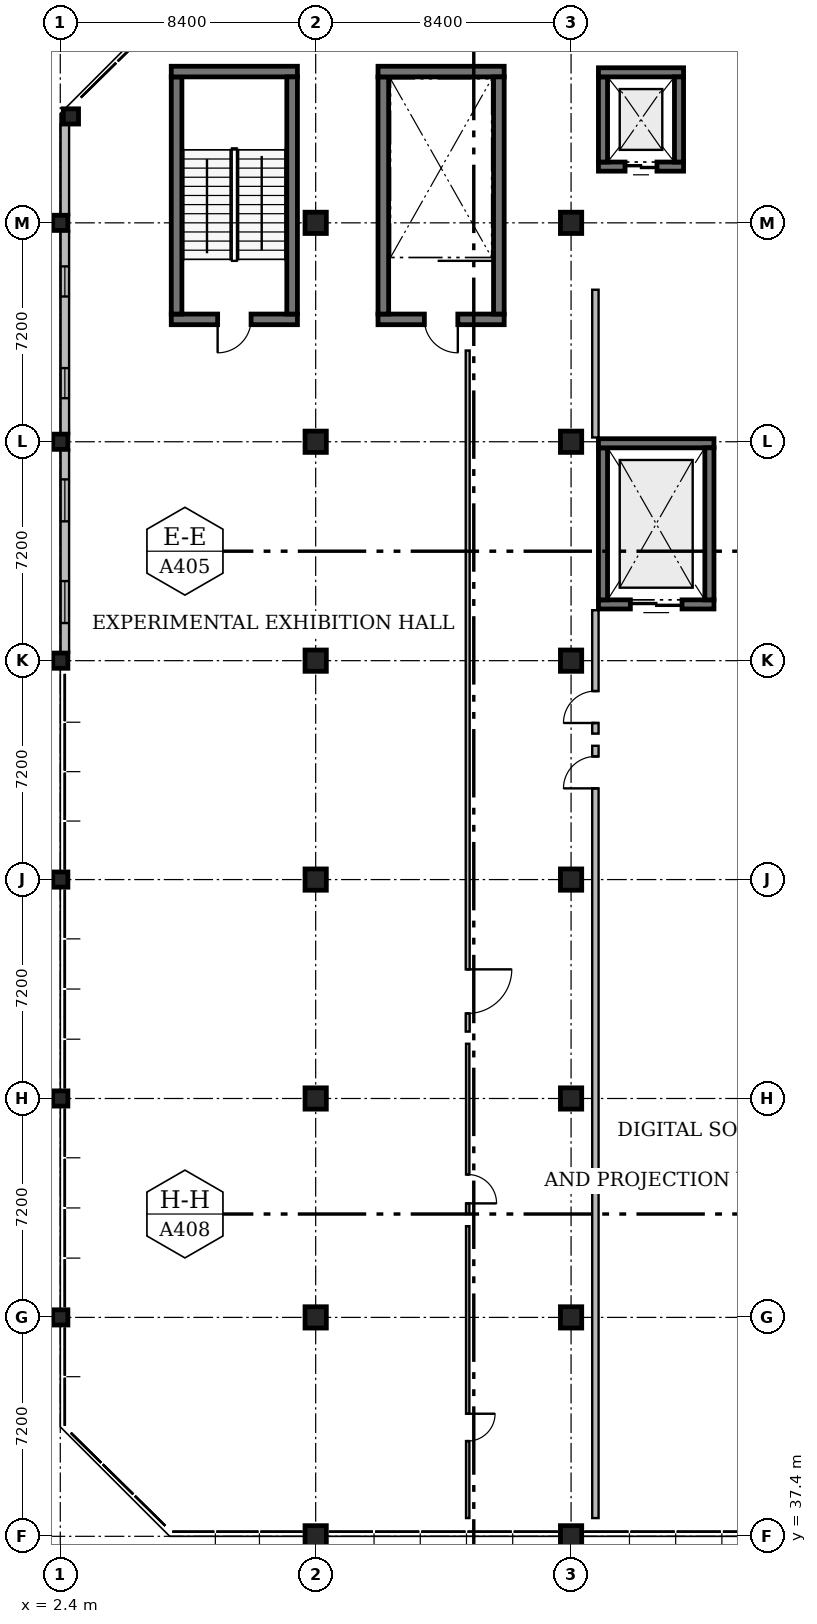
"""IFC4 building model, lengths in metres.
Left out: names, types, materials, properties, quantities, classifications, styles, units other than length and angle.
Written with IfcOpenShell. Run it as: python <this file> out.ifc"""

import sys

from ifc_helpers import new_model, si_unit, direction, frame, frame_2d, origin, origin_2d, place, context, subcontext, project, spatial, rectangle, extrude, element, fill, save


model = new_model("IFC4")
c1 = context("Model", 3, precision=1e-05, world=origin(), true_north=direction((0.0, 1.0)))
c2 = subcontext(c1, "Body", "Model", "MODEL_VIEW")
j1 = project(units=[si_unit("LENGTHUNIT", "METRE"), si_unit("PLANEANGLEUNIT", "RADIAN")], contexts=[c1])
p1 = place(None, origin())
s1 = spatial("IfcSite", under=j1, at=p1, CompositionType="ELEMENT")
p2 = place(p1, origin())
s2 = spatial("IfcBuilding", under=s1, at=p2, CompositionType="ELEMENT")
p3 = place(p2, origin())
s3 = spatial("IfcBuildingStorey", under=s2, at=p3, CompositionType="ELEMENT", Elevation=0.0)
for number, where, z_axis, x_axis in (
    (1, (2.4, 44.6, 0.0), (0.0, 0.0, 1.0), (1.0, 0.0, 0.0)),
    (2, (2.4, 51.8, 0.0), (0.0, 0.0, 1.0), (1.0, 0.0, 0.0)),
    (3, (2.4, 59.0, 0.0), (0.0, 0.0, 1.0), (1.0, 0.0, 0.0)),
    (4, (2.4, 66.2, 0.0), (0.0, 0.0, 1.0), (1.0, 0.0, 0.0)),
    (5, (2.4, 73.4, 0.0), (0.0, 0.0, 1.0), (1.0, 0.0, 0.0)),
    (6, (2.4, 80.6, 0.0), (0.0, 0.0, 1.0), (1.0, 0.0, 0.0)),
):
    element("IfcColumn", number, at=place(p3, frame(where, z_axis=z_axis, x_axis=x_axis)), inside=s3, PredefinedType="COLUMN", context=c2, shape_type="SweptSolid", body=[
        extrude(rectangle(XDim=0.5, YDim=0.5, at=origin_2d()), origin(), (0.0, 0.0, 1.0), 4.8),
    ])
p4 = place(p3, frame((10.8, 37.4, 0.0), z_axis=(0.0, 0.0, 1.0), x_axis=(1.0, 0.0, 0.0)))
e7 = element("IfcColumn", 7, at=p4, inside=s3, PredefinedType="COLUMN", context=c2, shape_type="SweptSolid", body=[
    extrude(rectangle(XDim=0.7, YDim=0.7, at=origin_2d()), origin(), (0.0, 0.0, 1.0), 4.66),
])
for number, where, z_axis, x_axis in (
    (8, (10.8, 44.6, 0.0), (0.0, 0.0, 1.0), (1.0, 0.0, 0.0)),
    (9, (10.8, 51.8, 0.0), (0.0, 0.0, 1.0), (1.0, 0.0, 0.0)),
    (10, (10.8, 59.0, 0.0), (0.0, 0.0, 1.0), (1.0, 0.0, 0.0)),
    (11, (10.8, 66.2, 0.0), (0.0, 0.0, 1.0), (1.0, 0.0, 0.0)),
    (12, (10.8, 73.4, 0.0), (0.0, 0.0, 1.0), (1.0, 0.0, 0.0)),
    (13, (10.8, 80.6, 0.0), (0.0, 0.0, 1.0), (1.0, 0.0, 0.0)),
):
    element("IfcColumn", number, at=place(p3, frame(where, z_axis=z_axis, x_axis=x_axis)), inside=s3, PredefinedType="COLUMN", context=c2, shape_type="SweptSolid", body=[
        extrude(rectangle(XDim=0.7, YDim=0.7, at=origin_2d()), origin(), (0.0, 0.0, 1.0), 4.8),
    ])
p5 = place(p3, frame((19.2, 37.4, 0.0), z_axis=(0.0, 0.0, 1.0), x_axis=(1.0, 0.0, 0.0)))
e14 = element("IfcColumn", 14, at=p5, inside=s3, PredefinedType="COLUMN", context=c2, shape_type="SweptSolid", body=[
    extrude(rectangle(XDim=0.7, YDim=0.7, at=origin_2d()), origin(), (0.0, 0.0, 1.0), 4.66),
])
for number, where, z_axis, x_axis in (
    (15, (19.2, 44.6, 0.0), (0.0, 0.0, 1.0), (1.0, 0.0, 0.0)),
    (16, (19.2, 51.8, 0.0), (0.0, 0.0, 1.0), (1.0, 0.0, 0.0)),
    (17, (19.2, 59.0, 0.0), (0.0, 0.0, 1.0), (1.0, 0.0, 0.0)),
    (18, (19.2, 66.2, 0.0), (0.0, 0.0, 1.0), (1.0, 0.0, 0.0)),
    (19, (19.2, 73.4, 0.0), (0.0, 0.0, 1.0), (1.0, 0.0, 0.0)),
    (20, (19.2, 80.6, 0.0), (0.0, 0.0, 1.0), (1.0, 0.0, 0.0)),
):
    element("IfcColumn", number, at=place(p3, frame(where, z_axis=z_axis, x_axis=x_axis)), inside=s3, PredefinedType="COLUMN", context=c2, shape_type="SweptSolid", body=[
        extrude(rectangle(XDim=0.7, YDim=0.7, at=origin_2d()), origin(), (0.0, 0.0, 1.0), 4.8),
    ])
p6 = place(p3, frame((2.75, 84.1, 0.0), z_axis=(0.0, 0.0, 1.0), x_axis=(1.0, 0.0, 0.0)))
e21 = element("IfcColumn", 21, at=p6, inside=s3, PredefinedType="COLUMN", context=c2, shape_type="SweptSolid", body=[
    extrude(rectangle(XDim=0.5, YDim=0.5, at=origin_2d()), origin(), (0.0, 0.0, 1.0), 4.8),
])
p7 = place(p3, frame((10.2, 77.425, 0.0), z_axis=(0.0, 0.0, 1.0), x_axis=(-1.0, 0.0, 0.0)))
e22 = element("IfcWall", 22, at=p7, inside=s3, PredefinedType="SOLIDWALL", context=c2, shape_type="SweptSolid", body=[
    extrude(rectangle(XDim=4.15, YDim=0.35, at=frame_2d((2.075, 0.0))), origin(), (0.0, 0.0, 1.0), 4.8),
])
p8 = place(p7, frame((1.525, 0.0, 0.0)))
e23 = element("IfcOpeningElement", 23, at=p8, cuts=e22, PredefinedType="OPENING", context=c2, shape_type="SweptSolid", body=[
    extrude(rectangle(XDim=1.1, YDim=2.15, at=frame_2d((0.55, 1.075))), frame((0.0, 0.195, 0.0), z_axis=(0.0, -1.0, 0.0), x_axis=(1.0, 0.0, 0.0)), (0.0, 0.0, 1.0), 0.39),
])
p9 = place(p3, frame((6.225, 77.6, 0.0), z_axis=(0.0, 0.0, 1.0), x_axis=(0.0, 1.0, 0.0)))
e24 = element("IfcWall", 24, at=p9, inside=s3, PredefinedType="SOLIDWALL", context=c2, shape_type="SweptSolid", body=[
    extrude(rectangle(XDim=7.8, YDim=0.35, at=frame_2d((3.9, 0.0))), origin(), (0.0, 0.0, 1.0), 4.8),
])
p10 = place(p3, frame((6.05, 85.575, 0.0), z_axis=(0.0, 0.0, 1.0), x_axis=(1.0, 0.0, 0.0)))
e25 = element("IfcWall", 25, at=p10, inside=s3, PredefinedType="SOLIDWALL", context=c2, shape_type="SweptSolid", body=[
    extrude(rectangle(XDim=4.15, YDim=0.35, at=frame_2d((2.075, 0.0))), origin(), (0.0, 0.0, 1.0), 4.8),
])
p11 = place(p3, frame((10.025, 85.4, 0.0), z_axis=(0.0, 0.0, 1.0), x_axis=(0.0, -1.0, 0.0)))
e26 = element("IfcWall", 26, at=p11, inside=s3, PredefinedType="SOLIDWALL", context=c2, shape_type="SweptSolid", body=[
    extrude(rectangle(XDim=7.8, YDim=0.35, at=frame_2d((3.9, 0.0))), origin(), (0.0, 0.0, 1.0), 4.8),
])
p12 = place(p3, frame((17.0, 77.425, 0.0), z_axis=(0.0, 0.0, 1.0), x_axis=(-1.0, 0.0, 0.0)))
e27 = element("IfcWall", 27, at=p12, inside=s3, PredefinedType="SOLIDWALL", context=c2, shape_type="SweptSolid", body=[
    extrude(rectangle(XDim=4.15, YDim=0.35, at=frame_2d((2.075, 0.0))), origin(), (0.0, 0.0, 1.0), 4.54),
])
p13 = place(p12, frame((1.525, 0.0, 0.0)))
e28 = element("IfcOpeningElement", 28, at=p13, cuts=e27, PredefinedType="OPENING", context=c2, shape_type="SweptSolid", body=[
    extrude(rectangle(XDim=1.1, YDim=2.15, at=frame_2d((0.55, 1.075))), frame((0.0, 0.195, 0.0), z_axis=(0.0, -1.0, 0.0), x_axis=(1.0, 0.0, 0.0)), (0.0, 0.0, 1.0), 0.39),
])
p14 = place(p3, frame((13.025, 77.6, 0.0), z_axis=(0.0, 0.0, 1.0), x_axis=(0.0, 1.0, 0.0)))
e29 = element("IfcWall", 29, at=p14, inside=s3, PredefinedType="SOLIDWALL", context=c2, shape_type="SweptSolid", body=[
    extrude(rectangle(XDim=7.8, YDim=0.35, at=frame_2d((3.9, 0.0))), origin(), (0.0, 0.0, 1.0), 4.54),
])
p15 = place(p3, frame((12.85, 85.575, 0.0), z_axis=(0.0, 0.0, 1.0), x_axis=(1.0, 0.0, 0.0)))
e30 = element("IfcWall", 30, at=p15, inside=s3, PredefinedType="SOLIDWALL", context=c2, shape_type="SweptSolid", body=[
    extrude(rectangle(XDim=4.15, YDim=0.35, at=frame_2d((2.075, 0.0))), origin(), (0.0, 0.0, 1.0), 4.54),
])
p16 = place(p3, frame((16.825, 85.4, 0.0), z_axis=(0.0, 0.0, 1.0), x_axis=(0.0, -1.0, 0.0)))
e31 = element("IfcWall", 31, at=p16, inside=s3, PredefinedType="SOLIDWALL", context=c2, shape_type="SweptSolid", body=[
    extrude(rectangle(XDim=7.8, YDim=0.35, at=frame_2d((3.9, 0.0))), origin(), (0.0, 0.0, 1.0), 4.54),
])
p17 = place(p3, frame((22.9, 82.45, 0.0), z_axis=(0.0, 0.0, 1.0), x_axis=(-1.0, 0.0, 0.0)))
e32 = element("IfcWall", 32, at=p17, inside=s3, PredefinedType="SOLIDWALL", context=c2, shape_type="SweptSolid", body=[
    extrude(rectangle(XDim=2.8, YDim=0.3, at=frame_2d((1.4, 0.0))), origin(), (0.0, 0.0, 1.0), 4.8),
])
p18 = place(p17, frame((0.875, 0.0, 0.0)))
e33 = element("IfcOpeningElement", 33, at=p18, cuts=e32, PredefinedType="OPENING", context=c2, shape_type="SweptSolid", body=[
    extrude(rectangle(XDim=1.05, YDim=2.15, at=frame_2d((0.525, 1.075))), frame((0.0, 0.17, 0.0), z_axis=(0.0, -1.0, 0.0), x_axis=(1.0, 0.0, 0.0)), (0.0, 0.0, 1.0), 0.34),
])
for number, where, z_axis, x_axis in (
    (34, (20.25, 82.6, 0.0), (0.0, 0.0, 1.0), (0.0, 1.0, 0.0)),
    (35, (20.1, 85.55, 0.0), (0.0, 0.0, 1.0), (1.0, 0.0, 0.0)),
    (36, (22.75, 85.4, 0.0), (0.0, 0.0, 1.0), (0.0, -1.0, 0.0)),
):
    element("IfcWall", number, at=place(p3, frame(where, z_axis=z_axis, x_axis=x_axis)), inside=s3, PredefinedType="SOLIDWALL", context=c2, shape_type="SweptSolid", body=[
        extrude(rectangle(XDim=2.8, YDim=0.3, at=frame_2d((1.4, 0.0))), origin(), (0.0, 0.0, 1.0), 4.8),
    ])
p19 = place(p3, frame((23.9, 68.05, 0.0), z_axis=(0.0, 0.0, 1.0), x_axis=(-1.0, 0.0, 0.0)))
e37 = element("IfcWall", 37, at=p19, inside=s3, PredefinedType="SOLIDWALL", context=c2, shape_type="SweptSolid", body=[
    extrude(rectangle(XDim=3.8, YDim=0.3, at=frame_2d((1.9, 0.0))), origin(), (0.0, 0.0, 1.0), 4.8),
])
p20 = place(p19, frame((1.05, 0.0, 0.0)))
e38 = element("IfcOpeningElement", 38, at=p20, cuts=e37, PredefinedType="OPENING", context=c2, shape_type="SweptSolid", body=[
    extrude(rectangle(XDim=1.7, YDim=2.4, at=frame_2d((0.85, 1.2))), frame((0.0, 0.17, 0.0), z_axis=(0.0, -1.0, 0.0), x_axis=(1.0, 0.0, 0.0)), (0.0, 0.0, 1.0), 0.34),
])
p21 = place(p3, frame((20.25, 68.2, 0.0), z_axis=(0.0, 0.0, 1.0), x_axis=(0.0, 1.0, 0.0)))
e39 = element("IfcWall", 39, at=p21, inside=s3, PredefinedType="SOLIDWALL", context=c2, shape_type="SweptSolid", body=[
    extrude(rectangle(XDim=5.0, YDim=0.3, at=frame_2d((2.5, 0.0))), origin(), (0.0, 0.0, 1.0), 4.8),
])
p22 = place(p3, frame((20.1, 73.35, 0.0), z_axis=(0.0, 0.0, 1.0), x_axis=(1.0, 0.0, 0.0)))
e40 = element("IfcWall", 40, at=p22, inside=s3, PredefinedType="SOLIDWALL", context=c2, shape_type="SweptSolid", body=[
    extrude(rectangle(XDim=3.8, YDim=0.3, at=frame_2d((1.9, 0.0))), origin(), (0.0, 0.0, 1.0), 4.8),
])
p23 = place(p3, frame((23.75, 73.2, 0.0), z_axis=(0.0, 0.0, 1.0), x_axis=(0.0, -1.0, 0.0)))
e41 = element("IfcWall", 41, at=p23, inside=s3, PredefinedType="SOLIDWALL", context=c2, shape_type="SweptSolid", body=[
    extrude(rectangle(XDim=5.0, YDim=0.3, at=frame_2d((2.5, 0.0))), origin(), (0.0, 0.0, 1.0), 4.8),
])
p24 = place(p3, frame((2.55, 66.455, 0.0), z_axis=(0.0, 0.0, 1.0), x_axis=(0.0, 1.0, 0.0)))
e42 = element("IfcWall", 42, at=p24, inside=s3, PredefinedType="SOLIDWALL", context=c2, shape_type="SweptSolid", body=[
    extrude(rectangle(XDim=6.69, YDim=0.28, at=frame_2d((3.345, 0.0))), origin(), (0.0, 0.0, 1.0), 3.873),
])
p25 = place(p24, frame((0.982, 0.0, 0.95)))
e43 = element("IfcOpeningElement", 43, at=p25, cuts=e42, PredefinedType="OPENING", context=c2, shape_type="SweptSolid", body=[
    extrude(rectangle(XDim=1.38, YDim=1.95, at=frame_2d((0.69, 0.975))), frame((0.0, 0.16, 0.0), z_axis=(0.0, -1.0, 0.0), x_axis=(1.0, 0.0, 0.0)), (0.0, 0.0, 1.0), 0.32),
])
p26 = place(p24, frame((4.327, 0.0, 0.95)))
e44 = element("IfcOpeningElement", 44, at=p26, cuts=e42, PredefinedType="OPENING", context=c2, shape_type="SweptSolid", body=[
    extrude(rectangle(XDim=1.38, YDim=1.95, at=frame_2d((0.69, 0.975))), frame((0.0, 0.16, 0.0), z_axis=(0.0, -1.0, 0.0), x_axis=(1.0, 0.0, 0.0)), (0.0, 0.0, 1.0), 0.32),
])
p27 = place(p3, frame((2.55, 73.655, 0.0), z_axis=(0.0, 0.0, 1.0), x_axis=(0.0, 1.0, 0.0)))
e45 = element("IfcWall", 45, at=p27, inside=s3, PredefinedType="SOLIDWALL", context=c2, shape_type="SweptSolid", body=[
    extrude(rectangle(XDim=6.69, YDim=0.28, at=frame_2d((3.345, 0.0))), origin(), (0.0, 0.0, 1.0), 3.873),
])
p28 = place(p27, frame((1.177, 0.0, 0.95)))
e46 = element("IfcOpeningElement", 46, at=p28, cuts=e45, PredefinedType="OPENING", context=c2, shape_type="SweptSolid", body=[
    extrude(rectangle(XDim=0.99, YDim=1.55, at=frame_2d((0.495, 0.775))), frame((0.0, 0.16, 0.0), z_axis=(0.0, -1.0, 0.0), x_axis=(1.0, 0.0, 0.0)), (0.0, 0.0, 1.0), 0.32),
])
p29 = place(p27, frame((4.522, 0.0, 0.95)))
e47 = element("IfcOpeningElement", 47, at=p29, cuts=e45, PredefinedType="OPENING", context=c2, shape_type="SweptSolid", body=[
    extrude(rectangle(XDim=0.99, YDim=1.55, at=frame_2d((0.495, 0.775))), frame((0.0, 0.16, 0.0), z_axis=(0.0, -1.0, 0.0), x_axis=(1.0, 0.0, 0.0)), (0.0, 0.0, 1.0), 0.32),
])
p30 = place(p3, frame((2.55, 80.855, 0.0), z_axis=(0.0, 0.0, 1.0), x_axis=(0.0, 1.0, 0.0)))
e48 = element("IfcWall", 48, at=p30, inside=s3, PredefinedType="SOLIDWALL", context=c2, shape_type="SweptSolid", body=[
    extrude(rectangle(XDim=2.99, YDim=0.28, at=frame_2d((1.495, 0.0))), origin(), (0.0, 0.0, 1.0), 4.54),
])
p31 = place(p3, frame((15.8, 47.6, 0.0), z_axis=(0.0, 0.0, 1.0), x_axis=(0.0, -1.0, 0.0)))
e49 = element("IfcWall", 49, at=p31, inside=s3, PredefinedType="PARTITIONING", context=c2, shape_type="SweptSolid", body=[
    extrude(rectangle(XDim=9.6, YDim=0.11, at=frame_2d((4.8, 0.0))), origin(), (0.0, 0.0, 1.0), 4.56),
])
p32 = place(p31, frame((6.168, 0.0, 0.0)))
e50 = element("IfcOpeningElement", 50, at=p32, cuts=e49, PredefinedType="OPENING", context=c2, shape_type="SweptSolid", body=[
    extrude(rectangle(XDim=0.9, YDim=2.15, at=frame_2d((0.45, 1.075))), frame((0.0, 0.075, 0.0), z_axis=(0.0, -1.0, 0.0), x_axis=(1.0, 0.0, 0.0)), (0.0, 0.0, 1.0), 0.15),
])
p33 = place(p3, frame((15.8, 53.6, 0.0), z_axis=(0.0, 0.0, 1.0), x_axis=(0.0, -1.0, 0.0)))
e51 = element("IfcWall", 51, at=p33, inside=s3, PredefinedType="PARTITIONING", context=c2, shape_type="SweptSolid", body=[
    extrude(rectangle(XDim=5.6, YDim=0.11, at=frame_2d((2.8, 0.0))), origin(), (0.0, 0.0, 1.0), 4.54),
])
p34 = place(p33, frame((4.3, 0.0, 0.0)))
e52 = element("IfcOpeningElement", 52, at=p34, cuts=e51, PredefinedType="OPENING", context=c2, shape_type="SweptSolid", body=[
    extrude(rectangle(XDim=0.95, YDim=2.1, at=frame_2d((0.475, 1.05))), frame((0.0, 0.075, 0.0), z_axis=(0.0, -1.0, 0.0), x_axis=(1.0, 0.0, 0.0)), (0.0, 0.0, 1.0), 0.15),
])
p35 = place(p3, frame((15.8, 76.4, 0.0), z_axis=(0.0, 0.0, 1.0), x_axis=(0.0, -1.0, 0.0)))
e53 = element("IfcWall", 53, at=p35, inside=s3, PredefinedType="PARTITIONING", context=c2, shape_type="SweptSolid", body=[
    extrude(rectangle(XDim=22.4, YDim=0.13, at=frame_2d((11.2, 0.0))), origin(), (0.0, 0.0, 1.0), 4.54),
])
p36 = place(p35, frame((20.353, 0.0, 0.0)))
e54 = element("IfcOpeningElement", 54, at=p36, cuts=e53, PredefinedType="OPENING", context=c2, shape_type="SweptSolid", body=[
    extrude(rectangle(XDim=1.45, YDim=2.2, at=frame_2d((0.725, 1.1))), frame((0.0, 0.085, 0.0), z_axis=(0.0, -1.0, 0.0), x_axis=(1.0, 0.0, 0.0)), (0.0, 0.0, 1.0), 0.17),
])
p37 = place(p3, frame((20.0, 38.0, 0.0), z_axis=(0.0, 0.0, 1.0), x_axis=(0.0, 1.0, 0.0)))
e55 = element("IfcWall", 55, at=p37, inside=s3, PredefinedType="PARTITIONING", context=c2, shape_type="SweptSolid", body=[
    extrude(rectangle(XDim=25.4, YDim=0.21, at=frame_2d((12.7, 0.0))), origin(), (0.0, 0.0, 1.0), 4.54),
])
p38 = place(p37, frame((24.0, 0.0, 0.0)))
e56 = element("IfcOpeningElement", 56, at=p38, cuts=e55, PredefinedType="OPENING", context=c2, shape_type="SweptSolid", body=[
    extrude(rectangle(XDim=1.05, YDim=2.25, at=frame_2d((0.525, 1.125))), frame((0.0, 0.125, 0.0), z_axis=(0.0, -1.0, 0.0), x_axis=(1.0, 0.0, 0.0)), (0.0, 0.0, 1.0), 0.25),
])
p39 = place(p3, frame((20.0, 63.8, 0.0), z_axis=(0.0, 0.0, 1.0), x_axis=(0.0, 1.0, 0.0)))
e57 = element("IfcWall", 57, at=p39, inside=s3, PredefinedType="PARTITIONING", context=c2, shape_type="SweptSolid", body=[
    extrude(rectangle(XDim=4.06, YDim=0.21, at=frame_2d((2.03, 0.0))), origin(), (0.0, 0.0, 1.0), 4.54),
])
p40 = place(p39, frame((0.35, 0.0, 0.0)))
e58 = element("IfcOpeningElement", 58, at=p40, cuts=e57, PredefinedType="OPENING", context=c2, shape_type="SweptSolid", body=[
    extrude(rectangle(XDim=1.05, YDim=2.25, at=frame_2d((0.525, 1.125))), frame((0.0, 0.125, 0.0), z_axis=(0.0, -1.0, 0.0), x_axis=(1.0, 0.0, 0.0)), (0.0, 0.0, 1.0), 0.25),
])
p41 = place(p3, frame((20.0, 73.54, 0.0), z_axis=(0.0, 0.0, 1.0), x_axis=(0.0, 1.0, 0.0)))
e59 = element("IfcWall", 59, at=p41, inside=s3, PredefinedType="PARTITIONING", context=c2, shape_type="SweptSolid", body=[
    extrude(rectangle(XDim=4.86, YDim=0.21, at=frame_2d((2.43, 0.0))), origin(), (0.0, 0.0, 1.0), 4.54),
])
p42 = place(p8, origin())
e60 = element("IfcDoor", 60, at=p42, inside=s3, OperationType="SINGLE_SWING_RIGHT", PredefinedType="DOOR", context=c2, shape_type="SweptSolid", body=[
    extrude(rectangle(XDim=1.1, YDim=2.15, at=frame_2d((0.55, 1.075))), frame((0.0, 0.025, 0.0), z_axis=(0.0, -1.0, 0.0), x_axis=(1.0, 0.0, 0.0)), (0.0, 0.0, 1.0), 0.05),
])
fill(e23, e60)
p43 = place(p13, origin())
e61 = element("IfcDoor", 61, at=p43, inside=s3, OperationType="SINGLE_SWING_LEFT", PredefinedType="DOOR", context=c2, shape_type="SweptSolid", body=[
    extrude(rectangle(XDim=1.1, YDim=2.15, at=frame_2d((0.55, 1.075))), frame((0.0, 0.025, 0.0), z_axis=(0.0, -1.0, 0.0), x_axis=(1.0, 0.0, 0.0)), (0.0, 0.0, 1.0), 0.05),
])
fill(e28, e61)
p44 = place(p18, origin())
e62 = element("IfcDoor", 62, at=p44, inside=s3, OperationType="DOUBLE_DOOR_SLIDING", PredefinedType="DOOR", context=c2, shape_type="SweptSolid", body=[
    extrude(rectangle(XDim=1.05, YDim=2.15, at=frame_2d((0.525, 1.075))), frame((0.0, 0.025, 0.0), z_axis=(0.0, -1.0, 0.0), x_axis=(1.0, 0.0, 0.0)), (0.0, 0.0, 1.0), 0.05),
])
fill(e33, e62)
p45 = place(p20, origin())
e63 = element("IfcDoor", 63, at=p45, inside=s3, OperationType="DOUBLE_DOOR_SLIDING", PredefinedType="DOOR", context=c2, shape_type="SweptSolid", body=[
    extrude(rectangle(XDim=1.7, YDim=2.4, at=frame_2d((0.85, 1.2))), frame((0.0, 0.025, 0.0), z_axis=(0.0, -1.0, 0.0), x_axis=(1.0, 0.0, 0.0)), (0.0, 0.0, 1.0), 0.05),
])
fill(e38, e63)
p46 = place(p25, origin())
e64 = element("IfcWindow", 64, at=p46, inside=s3, PartitioningType="SINGLE_PANEL", PredefinedType="WINDOW", context=c2, shape_type="SweptSolid", body=[
    extrude(rectangle(XDim=1.38, YDim=1.95, at=frame_2d((0.69, 0.975))), frame((0.0, 0.03, 0.0), z_axis=(0.0, -1.0, 0.0), x_axis=(1.0, 0.0, 0.0)), (0.0, 0.0, 1.0), 0.06),
])
fill(e43, e64)
p47 = place(p26, origin())
e65 = element("IfcWindow", 65, at=p47, inside=s3, PartitioningType="SINGLE_PANEL", PredefinedType="WINDOW", context=c2, shape_type="SweptSolid", body=[
    extrude(rectangle(XDim=1.38, YDim=1.95, at=frame_2d((0.69, 0.975))), frame((0.0, 0.03, 0.0), z_axis=(0.0, -1.0, 0.0), x_axis=(1.0, 0.0, 0.0)), (0.0, 0.0, 1.0), 0.06),
])
fill(e44, e65)
p48 = place(p28, origin())
e66 = element("IfcWindow", 66, at=p48, inside=s3, PartitioningType="SINGLE_PANEL", PredefinedType="WINDOW", context=c2, shape_type="SweptSolid", body=[
    extrude(rectangle(XDim=0.99, YDim=1.55, at=frame_2d((0.495, 0.775))), frame((0.0, 0.03, 0.0), z_axis=(0.0, -1.0, 0.0), x_axis=(1.0, 0.0, 0.0)), (0.0, 0.0, 1.0), 0.06),
])
fill(e46, e66)
p49 = place(p29, origin())
e67 = element("IfcWindow", 67, at=p49, inside=s3, PartitioningType="SINGLE_PANEL", PredefinedType="WINDOW", context=c2, shape_type="SweptSolid", body=[
    extrude(rectangle(XDim=0.99, YDim=1.55, at=frame_2d((0.495, 0.775))), frame((0.0, 0.03, 0.0), z_axis=(0.0, -1.0, 0.0), x_axis=(1.0, 0.0, 0.0)), (0.0, 0.0, 1.0), 0.06),
])
fill(e47, e67)
p50 = place(p32, origin())
e68 = element("IfcDoor", 68, at=p50, inside=s3, OperationType="SINGLE_SWING_LEFT", PredefinedType="DOOR", context=c2, shape_type="SweptSolid", body=[
    extrude(rectangle(XDim=0.9, YDim=2.15, at=frame_2d((0.45, 1.075))), frame((0.0, 0.025, 0.0), z_axis=(0.0, -1.0, 0.0), x_axis=(1.0, 0.0, 0.0)), (0.0, 0.0, 1.0), 0.05),
])
fill(e50, e68)
p51 = place(p34, origin())
e69 = element("IfcDoor", 69, at=p51, inside=s3, OperationType="SINGLE_SWING_RIGHT", PredefinedType="DOOR", context=c2, shape_type="SweptSolid", body=[
    extrude(rectangle(XDim=0.95, YDim=2.1, at=frame_2d((0.475, 1.05))), frame((0.0, 0.025, 0.0), z_axis=(0.0, -1.0, 0.0), x_axis=(1.0, 0.0, 0.0)), (0.0, 0.0, 1.0), 0.05),
])
fill(e52, e69)
p52 = place(p36, origin())
e70 = element("IfcDoor", 70, at=p52, inside=s3, OperationType="DOUBLE_DOOR_SINGLE_SWING", PredefinedType="DOOR", context=c2, shape_type="SweptSolid", body=[
    extrude(rectangle(XDim=1.45, YDim=2.2, at=frame_2d((0.725, 1.1))), frame((0.0, 0.025, 0.0), z_axis=(0.0, -1.0, 0.0), x_axis=(1.0, 0.0, 0.0)), (0.0, 0.0, 1.0), 0.05),
])
fill(e54, e70)
p53 = place(p38, origin())
e71 = element("IfcDoor", 71, at=p53, inside=s3, OperationType="SINGLE_SWING_LEFT", PredefinedType="DOOR", context=c2, shape_type="SweptSolid", body=[
    extrude(rectangle(XDim=1.05, YDim=2.25, at=frame_2d((0.525, 1.125))), frame((0.0, 0.025, 0.0), z_axis=(0.0, -1.0, 0.0), x_axis=(1.0, 0.0, 0.0)), (0.0, 0.0, 1.0), 0.05),
])
fill(e56, e71)
p54 = place(p40, origin())
e72 = element("IfcDoor", 72, at=p54, inside=s3, OperationType="SINGLE_SWING_LEFT", PredefinedType="DOOR", context=c2, shape_type="SweptSolid", body=[
    extrude(rectangle(XDim=1.05, YDim=2.25, at=frame_2d((0.525, 1.125))), frame((0.0, 0.025, 0.0), z_axis=(0.0, -1.0, 0.0), x_axis=(1.0, 0.0, 0.0)), (0.0, 0.0, 1.0), 0.05),
])
fill(e58, e72)
save(model, sys.argv[1])
